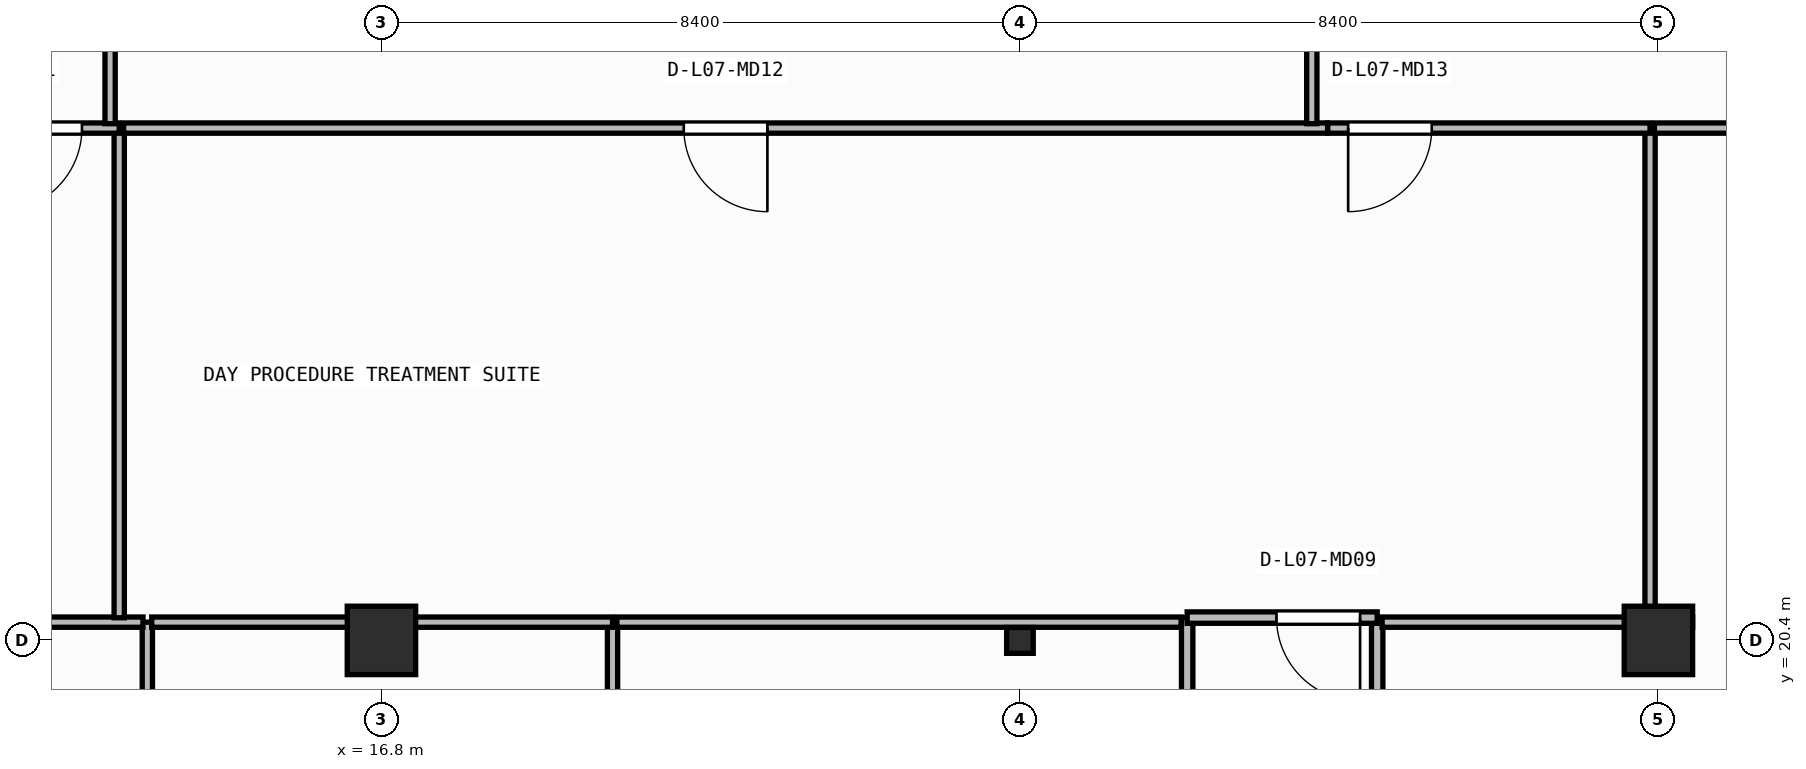
"""IFC4 building model, lengths in metres.
Left out: names, types, materials, properties, quantities, classifications, styles, units other than length and angle.
Written with IfcOpenShell. Run it as: python <this file> out.ifc"""

import sys

from ifc_helpers import new_model, si_unit, direction, frame, frame_2d, origin, origin_2d, place, context, subcontext, project, spatial, rectangle, i_section, extrude, element, fill, save


model = new_model("IFC4")
c1 = context("Model", 3, precision=1e-05, world=origin(), true_north=direction((0.0, 1.0)))
c2 = subcontext(c1, "Body", "Model", "MODEL_VIEW")
j1 = project(units=[si_unit("LENGTHUNIT", "METRE"), si_unit("PLANEANGLEUNIT", "RADIAN")], contexts=[c1])
p1 = place(None, origin())
s1 = spatial("IfcSite", under=j1, at=p1, CompositionType="ELEMENT")
p2 = place(p1, origin())
s2 = spatial("IfcBuilding", under=s1, at=p2, CompositionType="ELEMENT")
p3 = place(p2, frame((0.0, 0.0, 30.4)))
s3 = spatial("IfcBuildingStorey", under=s2, at=p3, CompositionType="ELEMENT", Elevation=30.4)
p4 = place(p3, frame((16.8, 20.4, 0.0), z_axis=(0.0, 0.0, 1.0), x_axis=(1.0, 0.0, 0.0)))
e1 = element("IfcColumn", 1, at=p4, inside=s3, PredefinedType="COLUMN", context=c2, shape_type="SweptSolid", body=[
    extrude(rectangle(XDim=0.9, YDim=0.9, at=origin_2d()), origin(), (0.0, 0.0, 1.0), 3.95),
])
p5 = place(p3, frame((25.2, 20.4, 0.0), z_axis=(0.0, 0.0, 1.0), x_axis=(1.0, 0.0, 0.0)))
e2 = element("IfcColumn", 2, at=p5, inside=s3, PredefinedType="COLUMN", context=c2, shape_type="SweptSolid", body=[
    extrude(i_section(OverallWidth=0.35, OverallDepth=0.34, WebThickness=0.016, FlangeThickness=0.028, at=origin_2d()), origin(), (0.0, 0.0, 1.0), 3.95),
])
p6 = place(p3, frame((33.6, 20.4, 0.0), z_axis=(0.0, 0.0, 1.0), x_axis=(1.0, 0.0, 0.0)))
e3 = element("IfcColumn", 3, at=p6, inside=s3, PredefinedType="COLUMN", context=c2, shape_type="SweptSolid", body=[
    extrude(rectangle(XDim=0.9, YDim=0.9, at=origin_2d()), origin(), (0.0, 0.0, 1.0), 3.95),
])
for number, where, z_axis, x_axis in (
    (4, (27.4, 20.7, 0.0), (0.0, 0.0, 1.0), (0.0, -1.0, 0.0)),
    (5, (29.9, 14.7, 0.0), (0.0, 0.0, 1.0), (0.0, 1.0, 0.0)),
):
    element("IfcWall", number, at=place(p3, frame(where, z_axis=z_axis, x_axis=x_axis)), inside=s3, PredefinedType="PARTITIONING", context=c2, shape_type="SweptSolid", body=[
        extrude(rectangle(XDim=6.0, YDim=0.15, at=frame_2d((3.0, 0.0))), origin(), (0.0, 0.0, 1.0), 3.71),
    ])
p7 = place(p3, frame((29.9, 20.7, 0.0), z_axis=(0.0, 0.0, 1.0), x_axis=(-1.0, 0.0, 0.0)))
e6 = element("IfcWall", 6, at=p7, inside=s3, PredefinedType="PARTITIONING", context=c2, shape_type="SweptSolid", body=[
    extrude(rectangle(XDim=2.5, YDim=0.15, at=frame_2d((1.25, 0.0))), origin(), (0.0, 0.0, 1.0), 3.073),
])
p8 = place(p7, frame((0.225, 0.0, 0.0)))
e7 = element("IfcOpeningElement", 7, at=p8, cuts=e6, PredefinedType="OPENING", context=c2, shape_type="SweptSolid", body=[
    extrude(rectangle(XDim=1.1, YDim=2.1, at=frame_2d((0.55, 1.05))), frame((0.0, 0.085, 0.0), z_axis=(0.0, -1.0, 0.0), x_axis=(1.0, 0.0, 0.0)), (0.0, 0.0, 1.0), 0.17),
])
p9 = place(p3, frame((13.72, 14.76, 0.0), z_axis=(0.0, 0.0, 1.0), x_axis=(0.0, 1.0, 0.0)))
e8 = element("IfcWall", 8, at=p9, inside=s3, PredefinedType="PARTITIONING", context=c2, shape_type="SweptSolid", body=[
    extrude(rectangle(XDim=5.88, YDim=0.135, at=frame_2d((2.94, 0.0))), origin(), (0.0, 0.0, 1.0), 3.71),
])
p10 = place(p3, frame((13.663, 20.64, 0.0), z_axis=(0.0, 0.0, 1.0), x_axis=(-1.0, 0.0, 0.0)))
e9 = element("IfcWall", 9, at=p10, inside=s3, PredefinedType="PARTITIONING", context=c2, shape_type="SweptSolid", body=[
    extrude(rectangle(XDim=3.885, YDim=0.135, at=frame_2d((1.942, 0.0))), origin(), (0.0, 0.0, 1.0), 3.073),
])
p11 = place(p3, frame((19.84, 14.76, 0.0), z_axis=(0.0, 0.0, 1.0), x_axis=(0.0, 1.0, 0.0)))
e10 = element("IfcWall", 10, at=p11, inside=s3, PredefinedType="PARTITIONING", context=c2, shape_type="SweptSolid", body=[
    extrude(rectangle(XDim=5.88, YDim=0.135, at=frame_2d((2.94, 0.0))), origin(), (0.0, 0.0, 1.0), 3.71),
])
p12 = place(p3, frame((19.84, 20.64, 0.0), z_axis=(0.0, 0.0, 1.0), x_axis=(-1.0, 0.0, 0.0)))
e11 = element("IfcWall", 11, at=p12, inside=s3, PredefinedType="PARTITIONING", context=c2, shape_type="SweptSolid", body=[
    extrude(rectangle(XDim=6.062, YDim=0.135, at=frame_2d((3.031, 0.0))), origin(), (0.0, 0.0, 1.0), 3.073),
])
p13 = place(p3, frame((27.32, 20.64, 0.0), z_axis=(0.0, 0.0, 1.0), x_axis=(-1.0, 0.0, 0.0)))
e12 = element("IfcWall", 12, at=p13, inside=s3, PredefinedType="PARTITIONING", context=c2, shape_type="SweptSolid", body=[
    extrude(rectangle(XDim=7.423, YDim=0.135, at=frame_2d((3.711, 0.0))), origin(), (0.0, 0.0, 1.0), 3.073),
])
p14 = place(p3, frame((34.05, 20.64, 0.0), z_axis=(0.0, 0.0, 1.0), x_axis=(-1.0, 0.0, 0.0)))
e13 = element("IfcWall", 13, at=p14, inside=s3, PredefinedType="PARTITIONING", context=c2, shape_type="SweptSolid", body=[
    extrude(rectangle(XDim=4.085, YDim=0.135, at=frame_2d((2.042, 0.0))), origin(), (0.0, 0.0, 1.0), 3.073),
])
p15 = place(p3, frame((13.35, 20.698, 0.0), z_axis=(0.0, 0.0, 1.0), x_axis=(0.0, 1.0, 0.0)))
e14 = element("IfcWall", 14, at=p15, inside=s3, PredefinedType="PARTITIONING", context=c2, shape_type="SweptSolid", body=[
    extrude(rectangle(XDim=6.442, YDim=0.135, at=frame_2d((3.221, 0.0))), origin(), (0.0, 0.0, 1.0), 3.71),
])
p16 = place(p3, frame((13.35, 27.14, 0.0), z_axis=(0.0, 0.0, 1.0), x_axis=(-1.0, 0.0, 0.0)))
e15 = element("IfcWall", 15, at=p16, inside=s3, PredefinedType="PARTITIONING", context=c2, shape_type="SweptSolid", body=[
    extrude(rectangle(XDim=13.11, YDim=0.135, at=frame_2d((6.555, 0.0))), origin(), (0.0, 0.0, 1.0), 3.71),
])
p17 = place(p16, frame((0.49, 0.0, 0.0)))
e16 = element("IfcOpeningElement", 16, at=p17, cuts=e15, PredefinedType="OPENING", context=c2, shape_type="SweptSolid", body=[
    extrude(rectangle(XDim=1.1, YDim=2.1, at=frame_2d((0.55, 1.05))), frame((0.0, 0.077, 0.0), z_axis=(0.0, -1.0, 0.0), x_axis=(1.0, 0.0, 0.0)), (0.0, 0.0, 1.0), 0.155),
])
p18 = place(p3, frame((33.49, 20.698, 0.0), z_axis=(0.0, 0.0, 1.0), x_axis=(0.0, 1.0, 0.0)))
e17 = element("IfcWall", 17, at=p18, inside=s3, PredefinedType="PARTITIONING", context=c2, shape_type="SweptSolid", body=[
    extrude(rectangle(XDim=6.442, YDim=0.135, at=frame_2d((3.221, 0.0))), origin(), (0.0, 0.0, 1.0), 3.073),
])
p19 = place(p3, frame((29.248, 27.14, 0.0), z_axis=(0.0, 0.0, 1.0), x_axis=(-1.0, 0.0, 0.0)))
e18 = element("IfcWall", 18, at=p19, inside=s3, PredefinedType="PARTITIONING", context=c2, shape_type="SweptSolid", body=[
    extrude(rectangle(XDim=15.84, YDim=0.135, at=frame_2d((7.92, 0.0))), origin(), (0.0, 0.0, 1.0), 3.71),
])
p20 = place(p19, frame((7.37, 0.0, 0.0)))
e19 = element("IfcOpeningElement", 19, at=p20, cuts=e18, PredefinedType="OPENING", context=c2, shape_type="SweptSolid", body=[
    extrude(rectangle(XDim=1.1, YDim=2.1, at=frame_2d((0.55, 1.05))), frame((0.0, 0.077, 0.0), z_axis=(0.0, -1.0, 0.0), x_axis=(1.0, 0.0, 0.0)), (0.0, 0.0, 1.0), 0.155),
])
p21 = place(p3, frame((33.49, 27.14, 0.0), z_axis=(0.0, 0.0, 1.0), x_axis=(-1.0, 0.0, 0.0)))
e20 = element("IfcWall", 20, at=p21, inside=s3, PredefinedType="PARTITIONING", context=c2, shape_type="SweptSolid", body=[
    extrude(rectangle(XDim=4.24, YDim=0.135, at=frame_2d((2.12, 0.0))), origin(), (0.0, 0.0, 1.0), 3.71),
])
p22 = place(p21, frame((2.872, 0.0, 0.0)))
e21 = element("IfcOpeningElement", 21, at=p22, cuts=e20, PredefinedType="OPENING", context=c2, shape_type="SweptSolid", body=[
    extrude(rectangle(XDim=1.1, YDim=2.1, at=frame_2d((0.55, 1.05))), frame((0.0, 0.077, 0.0), z_axis=(0.0, -1.0, 0.0), x_axis=(1.0, 0.0, 0.0)), (0.0, 0.0, 1.0), 0.155),
])
p23 = place(p3, frame((49.577, 27.14, 0.0), z_axis=(0.0, 0.0, 1.0), x_axis=(-1.0, 0.0, 0.0)))
e22 = element("IfcWall", 22, at=p23, inside=s3, PredefinedType="PARTITIONING", context=c2, shape_type="SweptSolid", body=[
    extrude(rectangle(XDim=16.03, YDim=0.135, at=frame_2d((8.015, 0.0))), origin(), (0.0, 0.0, 1.0), 3.71),
])
p24 = place(p3, frame((13.23, 27.198, 0.0), z_axis=(0.0, 0.0, 1.0), x_axis=(0.0, 1.0, 0.0)))
e23 = element("IfcWall", 23, at=p24, inside=s3, PredefinedType="PARTITIONING", context=c2, shape_type="SweptSolid", body=[
    extrude(rectangle(XDim=9.536, YDim=0.135, at=frame_2d((4.768, 0.0))), origin(), (0.0, 0.0, 1.0), 3.71),
])
p25 = place(p3, frame((29.04, 27.198, 0.0), z_axis=(0.0, 0.0, 1.0), x_axis=(0.0, 1.0, 0.0)))
e24 = element("IfcWall", 24, at=p25, inside=s3, PredefinedType="PARTITIONING", context=c2, shape_type="SweptSolid", body=[
    extrude(rectangle(XDim=4.25, YDim=0.135, at=frame_2d((2.125, 0.0))), origin(), (0.0, 0.0, 1.0), 3.71),
])
p26 = place(p8, origin())
e25 = element("IfcDoor", 25, at=p26, inside=s3, OperationType="SINGLE_SWING_LEFT", PredefinedType="DOOR", context=c2, shape_type="SweptSolid", body=[
    extrude(rectangle(XDim=1.1, YDim=2.1, at=frame_2d((0.55, 1.05))), frame((0.0, 0.025, 0.0), z_axis=(0.0, -1.0, 0.0), x_axis=(1.0, 0.0, 0.0)), (0.0, 0.0, 1.0), 0.05),
])
fill(e7, e25)
p27 = place(p17, origin())
e26 = element("IfcDoor", 26, at=p27, inside=s3, OperationType="SINGLE_SWING_RIGHT", PredefinedType="DOOR", context=c2, shape_type="SweptSolid", body=[
    extrude(rectangle(XDim=1.1, YDim=2.1, at=frame_2d((0.55, 1.05))), frame((0.0, 0.025, 0.0), z_axis=(0.0, -1.0, 0.0), x_axis=(1.0, 0.0, 0.0)), (0.0, 0.0, 1.0), 0.05),
])
fill(e16, e26)
p28 = place(p20, origin())
e27 = element("IfcDoor", 27, at=p28, inside=s3, OperationType="SINGLE_SWING_LEFT", PredefinedType="DOOR", context=c2, shape_type="SweptSolid", body=[
    extrude(rectangle(XDim=1.1, YDim=2.1, at=frame_2d((0.55, 1.05))), frame((0.0, 0.025, 0.0), z_axis=(0.0, -1.0, 0.0), x_axis=(1.0, 0.0, 0.0)), (0.0, 0.0, 1.0), 0.05),
])
fill(e19, e27)
p29 = place(p22, origin())
e28 = element("IfcDoor", 28, at=p29, inside=s3, OperationType="SINGLE_SWING_RIGHT", PredefinedType="DOOR", context=c2, shape_type="SweptSolid", body=[
    extrude(rectangle(XDim=1.1, YDim=2.1, at=frame_2d((0.55, 1.05))), frame((0.0, 0.025, 0.0), z_axis=(0.0, -1.0, 0.0), x_axis=(1.0, 0.0, 0.0)), (0.0, 0.0, 1.0), 0.05),
])
fill(e21, e28)
save(model, sys.argv[1])
